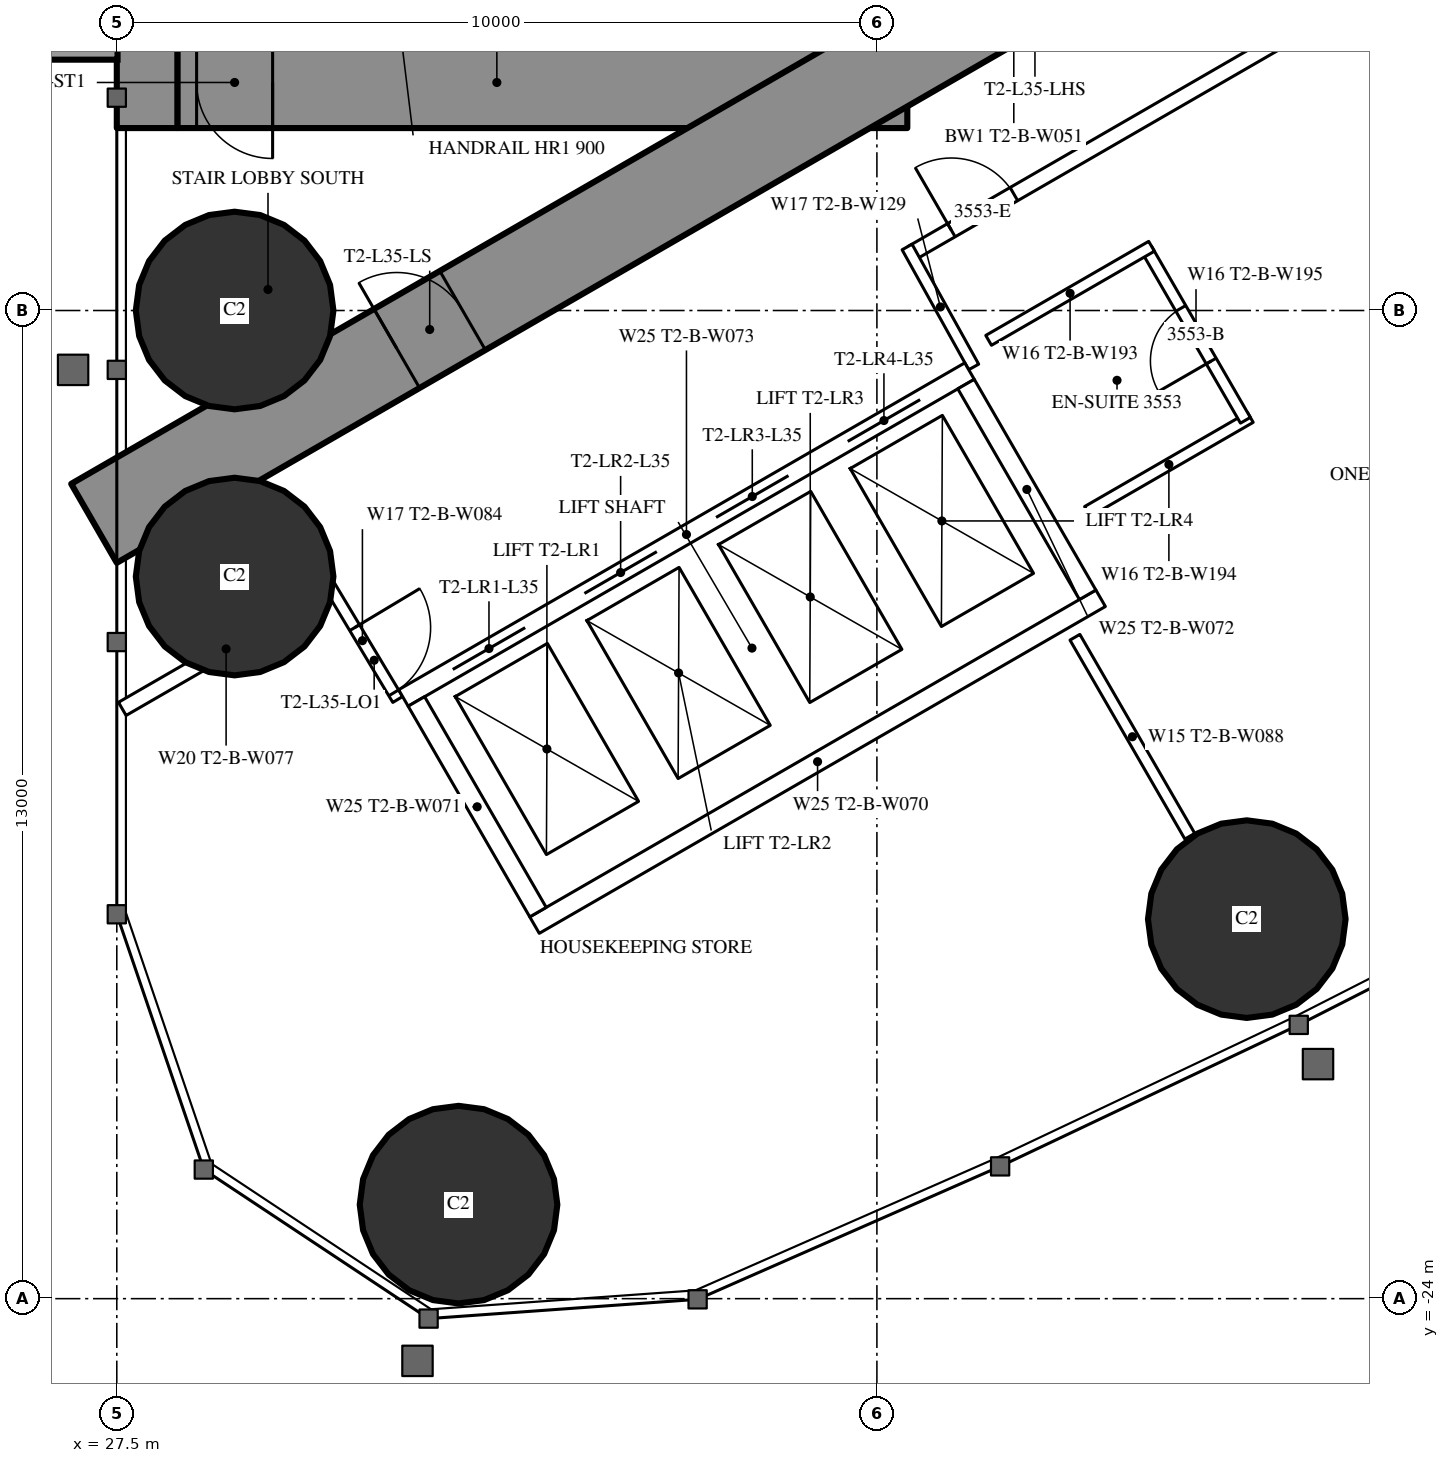
"""IFC4 building model, lengths in metres.
Left out: names, types, materials, properties, quantities, classifications, styles, units other than length and angle.
Written with IfcOpenShell. Run it as: python <this file> out.ifc"""

import sys

from ifc_helpers import new_model, si_unit, direction, frame, frame_2d, origin, origin_2d, place, context, subcontext, project, spatial, rectangle, hollow_circle, extrude, element, fill, save


model = new_model("IFC4")
c1 = context("Model", 3, precision=1e-05, world=origin(), true_north=direction((0.0, 1.0)))
c2 = subcontext(c1, "Body", "Model", "MODEL_VIEW")
j1 = project(units=[si_unit("LENGTHUNIT", "METRE"), si_unit("PLANEANGLEUNIT", "RADIAN")], contexts=[c1])
p1 = place(None, origin())
s1 = spatial("IfcSite", under=j1, at=p1, CompositionType="ELEMENT")
p2 = place(p1, origin())
s2 = spatial("IfcBuilding", under=s1, at=p2, CompositionType="ELEMENT")
p3 = place(p2, frame((0.0, 0.0, 132.6)))
s3 = spatial("IfcBuildingStorey", under=s2, at=p3, CompositionType="ELEMENT", Elevation=132.6)
for number, where, z_axis, x_axis in (
    (1, (31.996, -22.763, 0.0), (0.0, 0.0, 1.0), (1.0, 0.0, 0.0)),
    (2, (29.05, -11.0, 0.0), (0.0, 0.0, 1.0), (1.0, 0.0, 0.0)),
    (3, (29.05, -14.5, 0.0), (0.0, 0.0, 1.0), (1.0, 0.0, 0.0)),
    (4, (42.366, -19.007, 0.0), (0.0, 0.0, 1.0), (1.0, 0.0, 0.0)),
):
    element("IfcColumn", number, at=place(p3, frame(where, z_axis=z_axis, x_axis=x_axis)), inside=s3, PredefinedType="COLUMN", context=c2, shape_type="SweptSolid", body=[
        extrude(hollow_circle(Radius=1.3, WallThickness=0.1, at=origin_2d()), origin(), (0.0, 0.0, 1.0), 3.5),
    ])
p4 = place(p3, frame((27.9, -8.6, 0.0), z_axis=(0.0, 0.0, 1.0), x_axis=(0.0, 1.0, 0.0)))
e5 = element("IfcWall", 5, at=p4, inside=s3, PredefinedType="SHEAR", context=c2, shape_type="SweptSolid", body=[
    extrude(rectangle(XDim=17.2, YDim=0.8, at=frame_2d((8.6, 0.0))), origin(), (0.0, 0.0, 1.0), 3.5),
])
p5 = place(p4, frame((2.45, 0.0, 0.6)))
e6 = element("IfcOpeningElement", 6, at=p5, cuts=e5, PredefinedType="OPENING", context=c2, shape_type="SweptSolid", body=[
    extrude(rectangle(XDim=0.6, YDim=2.1, at=frame_2d((0.3, 1.05))), frame((0.0, 0.41, 0.0), z_axis=(0.0, -1.0, 0.0), x_axis=(1.0, 0.0, 0.0)), (0.0, 0.0, 1.0), 0.82),
])
p6 = place(p4, frame((14.15, 0.0, 0.6)))
e7 = element("IfcOpeningElement", 7, at=p6, cuts=e5, PredefinedType="OPENING", context=c2, shape_type="SweptSolid", body=[
    extrude(rectangle(XDim=0.6, YDim=2.1, at=frame_2d((0.3, 1.05))), frame((0.0, 0.41, 0.0), z_axis=(0.0, -1.0, 0.0), x_axis=(1.0, 0.0, 0.0)), (0.0, 0.0, 1.0), 0.82),
])
p7 = place(p3, frame((37.3, -8.6, 0.0), z_axis=(0.0, 0.0, 1.0), x_axis=(0.0, 1.0, 0.0)))
e8 = element("IfcWall", 8, at=p7, inside=s3, PredefinedType="SHEAR", context=c2, shape_type="SweptSolid", body=[
    extrude(rectangle(XDim=17.2, YDim=1.2, at=frame_2d((8.6, 0.0))), origin(), (0.0, 0.0, 1.0), 3.5),
])
p8 = place(p7, frame((7.7, 0.0, 0.0)))
e9 = element("IfcOpeningElement", 9, at=p8, cuts=e8, PredefinedType="OPENING", context=c2, shape_type="SweptSolid", body=[
    extrude(rectangle(XDim=1.8, YDim=2.2, at=frame_2d((0.9, 1.1))), frame((0.0, 0.61, 0.0), z_axis=(0.0, -1.0, 0.0), x_axis=(1.0, 0.0, 0.0)), (0.0, 0.0, 1.0), 1.22),
])
p9 = place(p3, frame((28.3, -8.0, 0.0), z_axis=(0.0, 0.0, 1.0), x_axis=(1.0, 0.0, 0.0)))
e10 = element("IfcWall", 10, at=p9, inside=s3, PredefinedType="SHEAR", context=c2, shape_type="SweptSolid", body=[
    extrude(rectangle(XDim=8.4, YDim=1.2, at=frame_2d((4.2, 0.0))), origin(), (0.0, 0.0, 1.0), 3.5),
])
p10 = place(p9, frame((0.25, 0.0, 0.0)))
e11 = element("IfcOpeningElement", 11, at=p10, cuts=e10, PredefinedType="OPENING", context=c2, shape_type="SweptSolid", body=[
    extrude(rectangle(XDim=1.0, YDim=2.2, at=frame_2d((0.5, 1.1))), frame((0.0, 0.61, 0.0), z_axis=(0.0, -1.0, 0.0), x_axis=(1.0, 0.0, 0.0)), (0.0, 0.0, 1.0), 1.22),
])
p11 = place(p3, frame((27.2, -13.8, 0.0), z_axis=(0.0, 0.0, 1.0), x_axis=(0.866027159892, 0.499996958321, 0.0)))
e12 = element("IfcWall", 12, at=p11, inside=s3, PredefinedType="SHEAR", context=c2, shape_type="SweptSolid", body=[
    extrude(rectangle(XDim=27.947, YDim=1.2, at=frame_2d((13.973, 0.0))), origin(), (0.0, 0.0, 1.0), 3.5),
])
p12 = place(p11, frame((4.6, 0.0, 0.0)))
e13 = element("IfcOpeningElement", 13, at=p12, cuts=e12, PredefinedType="OPENING", context=c2, shape_type="SweptSolid", body=[
    extrude(rectangle(XDim=1.0, YDim=2.2, at=frame_2d((0.5, 1.1))), frame((0.0, 0.61, 0.0), z_axis=(0.0, -1.0, 0.0), x_axis=(1.0, 0.0, 0.0)), (0.0, 0.0, 1.0), 1.22),
])
p13 = place(p11, frame((13.395, 0.0, 0.0)))
e14 = element("IfcOpeningElement", 14, at=p13, cuts=e12, PredefinedType="OPENING", context=c2, shape_type="SweptSolid", body=[
    extrude(rectangle(XDim=1.8, YDim=2.2, at=frame_2d((0.9, 1.1))), frame((0.0, 0.61, 0.0), z_axis=(0.0, -1.0, 0.0), x_axis=(1.0, 0.0, 0.0)), (0.0, 0.0, 1.0), 1.22),
])
p14 = place(p3, frame((40.105, -15.299, 0.0), z_axis=(0.0, 0.0, 1.0), x_axis=(0.499978822259, -0.866037630414, 0.0)))
e15 = element("IfcWall", 15, at=p14, inside=s3, PredefinedType="PARTITIONING", context=c2, shape_type="SweptSolid", body=[
    extrude(rectangle(XDim=3.023, YDim=0.15, at=frame_2d((1.511, 0.0))), origin(), (0.0, 0.0, 1.0), 3.25),
])
p15 = place(p3, frame((27.572, -16.241, 0.0), z_axis=(0.0, 0.0, 1.0), x_axis=(0.866029654818, 0.499992636921, 0.0)))
e16 = element("IfcWall", 16, at=p15, inside=s3, PredefinedType="PARTITIONING", context=c2, shape_type="SweptSolid", body=[
    extrude(rectangle(XDim=3.155, YDim=0.2, at=frame_2d((1.577, 0.0))), origin(), (0.0, 0.0, 1.0), 3.25),
])
p16 = place(p3, frame((37.96, -10.243, 0.0), z_axis=(0.0, 0.0, 1.0), x_axis=(0.866026429433, 0.499998223521, 0.0)))
e17 = element("IfcWall", 17, at=p16, inside=s3, PredefinedType="PARTITIONING", context=c2, shape_type="SweptSolid", body=[
    extrude(rectangle(XDim=20.487, YDim=0.2, at=frame_2d((10.243, 0.0))), origin(), (0.0, 0.0, 1.0), 3.25),
])
p17 = place(p16, frame((10.743, 0.0, 0.0)))
e18 = element("IfcOpeningElement", 18, at=p17, cuts=e17, PredefinedType="OPENING", context=c2, shape_type="SweptSolid", body=[
    extrude(rectangle(XDim=0.95, YDim=2.2, at=frame_2d((0.475, 1.1))), frame((0.0, 0.11, 0.0), z_axis=(0.0, -1.0, 0.0), x_axis=(1.0, 0.0, 0.0)), (0.0, 0.0, 1.0), 0.22),
])
p18 = place(p16, frame((17.586, 0.0, 0.0)))
e19 = element("IfcOpeningElement", 19, at=p18, cuts=e17, PredefinedType="OPENING", context=c2, shape_type="SweptSolid", body=[
    extrude(rectangle(XDim=1.8, YDim=2.2, at=frame_2d((0.9, 1.1))), frame((0.0, 0.11, 0.0), z_axis=(0.0, -1.0, 0.0), x_axis=(1.0, 0.0, 0.0)), (0.0, 0.0, 1.0), 0.22),
])
p19 = place(p16, frame((0.6, 0.0, 0.0)))
e20 = element("IfcOpeningElement", 20, at=p19, cuts=e17, PredefinedType="OPENING", context=c2, shape_type="SweptSolid", body=[
    extrude(rectangle(XDim=0.95, YDim=2.2, at=frame_2d((0.475, 1.1))), frame((0.0, 0.11, 0.0), z_axis=(0.0, -1.0, 0.0), x_axis=(1.0, 0.0, 0.0)), (0.0, 0.0, 1.0), 0.22),
])
p20 = place(p3, frame((38.773, -11.742, 0.0), z_axis=(0.0, 0.0, 1.0), x_axis=(-0.485528096672, 0.8742210632, 0.0)))
e21 = element("IfcWall", 21, at=p20, inside=s3, PredefinedType="PARTITIONING", context=c2, shape_type="SweptSolid", body=[
    extrude(rectangle(XDim=1.805, YDim=0.15, at=frame_2d((0.903, 0.0))), origin(), (0.0, 0.0, 1.0), 3.25),
])
p21 = place(p3, frame((30.267, -14.569, 0.0), z_axis=(0.0, 0.0, 1.0), x_axis=(0.514336634837, -0.857588377991, 0.0)))
e22 = element("IfcWall", 22, at=p21, inside=s3, PredefinedType="PARTITIONING", context=c2, shape_type="SweptSolid", body=[
    extrude(rectangle(XDim=1.805, YDim=0.15, at=frame_2d((0.903, 0.0))), origin(), (0.0, 0.0, 1.0), 3.25),
])
p22 = place(p21, frame((0.703, 0.0, 0.0)))
e23 = element("IfcOpeningElement", 23, at=p22, cuts=e22, PredefinedType="OPENING", context=c2, shape_type="SweptSolid", body=[
    extrude(rectangle(XDim=1.0, YDim=2.2, at=frame_2d((0.5, 1.1))), frame((0.0, 0.085, 0.0), z_axis=(0.0, -1.0, 0.0), x_axis=(1.0, 0.0, 0.0)), (0.0, 0.0, 1.0), 0.17),
])
p23 = place(p3, frame((40.27, -13.644, 0.0), z_axis=(0.0, 0.0, 1.0), x_axis=(0.866031185235, 0.4999899861, 0.0)))
e24 = element("IfcWall", 24, at=p23, inside=s3, PredefinedType="PARTITIONING", context=c2, shape_type="SweptSolid", body=[
    extrude(rectangle(XDim=2.475, YDim=0.15, at=frame_2d((1.238, 0.0))), origin(), (0.0, 0.0, 1.0), 3.25),
])
p24 = place(p3, frame((41.048, -10.193, 0.0), z_axis=(0.0, 0.0, 1.0), x_axis=(0.500047596559, -0.865997922154, 0.0)))
e25 = element("IfcWall", 25, at=p24, inside=s3, PredefinedType="PARTITIONING", context=c2, shape_type="SweptSolid", body=[
    extrude(rectangle(XDim=2.6, YDim=0.15, at=frame_2d((1.3, 0.0))), origin(), (0.0, 0.0, 1.0), 3.25),
])
p25 = place(p24, frame((0.9, 0.0, 0.0)))
e26 = element("IfcOpeningElement", 26, at=p25, cuts=e25, PredefinedType="OPENING", context=c2, shape_type="SweptSolid", body=[
    extrude(rectangle(XDim=0.8, YDim=2.2, at=frame_2d((0.4, 1.1))), frame((0.0, 0.085, 0.0), z_axis=(0.0, -1.0, 0.0), x_axis=(1.0, 0.0, 0.0)), (0.0, 0.0, 1.0), 0.17),
])
p26 = place(p3, frame((38.97, -11.393, 0.0), z_axis=(0.0, 0.0, 1.0), x_axis=(0.866031185235, 0.4999899861, 0.0)))
e27 = element("IfcWall", 27, at=p26, inside=s3, PredefinedType="PARTITIONING", context=c2, shape_type="SweptSolid", body=[
    extrude(rectangle(XDim=2.475, YDim=0.15, at=frame_2d((1.238, 0.0))), origin(), (0.0, 0.0, 1.0), 3.25),
])
p27 = place(p3, frame((31.271, -16.097, 0.0), z_axis=(0.0, 0.0, 1.0), x_axis=(0.86604045752, 0.499973925258, 0.0)))
e28 = element("IfcWall", 28, at=p27, inside=s3, PredefinedType="PARTITIONING", context=c2, shape_type="SweptSolid", body=[
    extrude(rectangle(XDim=8.6, YDim=0.25, at=frame_2d((4.3, 0.0))), origin(), (0.0, 0.0, 1.0), 3.25),
])
p28 = place(p27, frame((0.75, 0.0, 0.0)))
e29 = element("IfcOpeningElement", 29, at=p28, cuts=e28, PredefinedType="OPENING", context=c2, shape_type="SweptSolid", body=[
    extrude(rectangle(XDim=1.1, YDim=2.2, at=frame_2d((0.55, 1.1))), frame((0.0, 0.135, 0.0), z_axis=(0.0, -1.0, 0.0), x_axis=(1.0, 0.0, 0.0)), (0.0, 0.0, 1.0), 0.27),
])
p29 = place(p27, frame((2.75, 0.0, 0.0)))
e30 = element("IfcOpeningElement", 30, at=p29, cuts=e28, PredefinedType="OPENING", context=c2, shape_type="SweptSolid", body=[
    extrude(rectangle(XDim=1.1, YDim=2.2, at=frame_2d((0.55, 1.1))), frame((0.0, 0.135, 0.0), z_axis=(0.0, -1.0, 0.0), x_axis=(1.0, 0.0, 0.0)), (0.0, 0.0, 1.0), 0.27),
])
p30 = place(p27, frame((4.75, 0.0, 0.0)))
e31 = element("IfcOpeningElement", 31, at=p30, cuts=e28, PredefinedType="OPENING", context=c2, shape_type="SweptSolid", body=[
    extrude(rectangle(XDim=1.1, YDim=2.2, at=frame_2d((0.55, 1.1))), frame((0.0, 0.135, 0.0), z_axis=(0.0, -1.0, 0.0), x_axis=(1.0, 0.0, 0.0)), (0.0, 0.0, 1.0), 0.27),
])
p31 = place(p27, frame((6.75, 0.0, 0.0)))
e32 = element("IfcOpeningElement", 32, at=p31, cuts=e28, PredefinedType="OPENING", context=c2, shape_type="SweptSolid", body=[
    extrude(rectangle(XDim=1.1, YDim=2.2, at=frame_2d((0.55, 1.1))), frame((0.0, 0.135, 0.0), z_axis=(0.0, -1.0, 0.0), x_axis=(1.0, 0.0, 0.0)), (0.0, 0.0, 1.0), 0.27),
])
p32 = place(p3, frame((32.996, -19.086, 0.0), z_axis=(0.0, 0.0, 1.0), x_axis=(0.866028165386, 0.499995216735, 0.0)))
e33 = element("IfcWall", 33, at=p32, inside=s3, PredefinedType="PARTITIONING", context=c2, shape_type="SweptSolid", body=[
    extrude(rectangle(XDim=8.6, YDim=0.25, at=frame_2d((4.3, 0.0))), origin(), (0.0, 0.0, 1.0), 3.25),
])
for number, where, z_axis, x_axis in (
    (34, (31.441, -16.143, 0.0), (0.0, 0.0, 1.0), (0.5, -0.866, 0.0)),
    (35, (38.673, -11.968, 0.0), (0.0, 0.0, 1.0), (0.5, -0.866, 0.0)),
):
    element("IfcWall", number, at=place(p3, frame(where, z_axis=z_axis, x_axis=x_axis)), inside=s3, PredefinedType="PARTITIONING", context=c2, shape_type="SweptSolid", body=[
        extrude(rectangle(XDim=3.201, YDim=0.25, at=frame_2d((1.6, 0.0))), origin(), (0.0, 0.0, 1.0), 3.25),
    ])
p33 = place(p25, origin())
e36 = element("IfcDoor", 36, at=p33, inside=s3, OperationType="SINGLE_SWING_RIGHT", PredefinedType="DOOR", context=c2, shape_type="SweptSolid", body=[
    extrude(rectangle(XDim=0.8, YDim=2.2, at=frame_2d((0.4, 1.1))), frame((0.0, 0.025, 0.0), z_axis=(0.0, -1.0, 0.0), x_axis=(1.0, 0.0, 0.0)), (0.0, 0.0, 1.0), 0.05),
])
fill(e26, e36)
p34 = place(p19, origin())
e37 = element("IfcDoor", 37, at=p34, inside=s3, OperationType="SINGLE_SWING_LEFT", PredefinedType="DOOR", context=c2, shape_type="SweptSolid", body=[
    extrude(rectangle(XDim=0.95, YDim=2.2, at=frame_2d((0.475, 1.1))), frame((0.0, 0.025, 0.0), z_axis=(0.0, -1.0, 0.0), x_axis=(1.0, 0.0, 0.0)), (0.0, 0.0, 1.0), 0.05),
])
fill(e20, e37)
p35 = place(p22, origin())
e38 = element("IfcDoor", 38, at=p35, inside=s3, OperationType="SINGLE_SWING_LEFT", PredefinedType="DOOR", context=c2, shape_type="SweptSolid", body=[
    extrude(rectangle(XDim=1.0, YDim=2.2, at=frame_2d((0.5, 1.1))), frame((0.0, 0.025, 0.0), z_axis=(0.0, -1.0, 0.0), x_axis=(1.0, 0.0, 0.0)), (0.0, 0.0, 1.0), 0.05),
])
fill(e23, e38)
p36 = place(p12, origin())
e39 = element("IfcDoor", 39, at=p36, inside=s3, OperationType="SINGLE_SWING_LEFT", PredefinedType="DOOR", context=c2, shape_type="SweptSolid", body=[
    extrude(rectangle(XDim=1.0, YDim=2.2, at=frame_2d((0.5, 1.1))), frame((0.0, 0.025, 0.0), z_axis=(0.0, -1.0, 0.0), x_axis=(1.0, 0.0, 0.0)), (0.0, 0.0, 1.0), 0.05),
])
fill(e13, e39)
p37 = place(p10, origin())
e40 = element("IfcDoor", 40, at=p37, inside=s3, OperationType="SINGLE_SWING_RIGHT", PredefinedType="DOOR", context=c2, shape_type="SweptSolid", body=[
    extrude(rectangle(XDim=1.0, YDim=2.2, at=frame_2d((0.5, 1.1))), frame((0.0, 0.025, 0.0), z_axis=(0.0, -1.0, 0.0), x_axis=(1.0, 0.0, 0.0)), (0.0, 0.0, 1.0), 0.05),
])
fill(e11, e40)
p38 = place(p28, origin())
e41 = element("IfcDoor", 41, at=p38, inside=s3, OperationType="DOUBLE_DOOR_SLIDING", PredefinedType="USERDEFINED", context=c2, shape_type="SweptSolid", body=[
    extrude(rectangle(XDim=1.1, YDim=2.2, at=frame_2d((0.55, 1.1))), frame((0.0, 0.025, 0.0), z_axis=(0.0, -1.0, 0.0), x_axis=(1.0, 0.0, 0.0)), (0.0, 0.0, 1.0), 0.05),
])
fill(e29, e41)
p39 = place(p29, origin())
e42 = element("IfcDoor", 42, at=p39, inside=s3, OperationType="DOUBLE_DOOR_SLIDING", PredefinedType="USERDEFINED", context=c2, shape_type="SweptSolid", body=[
    extrude(rectangle(XDim=1.1, YDim=2.2, at=frame_2d((0.55, 1.1))), frame((0.0, 0.025, 0.0), z_axis=(0.0, -1.0, 0.0), x_axis=(1.0, 0.0, 0.0)), (0.0, 0.0, 1.0), 0.05),
])
fill(e30, e42)
p40 = place(p30, origin())
e43 = element("IfcDoor", 43, at=p40, inside=s3, OperationType="DOUBLE_DOOR_SLIDING", PredefinedType="USERDEFINED", context=c2, shape_type="SweptSolid", body=[
    extrude(rectangle(XDim=1.1, YDim=2.2, at=frame_2d((0.55, 1.1))), frame((0.0, 0.025, 0.0), z_axis=(0.0, -1.0, 0.0), x_axis=(1.0, 0.0, 0.0)), (0.0, 0.0, 1.0), 0.05),
])
fill(e31, e43)
p41 = place(p31, origin())
e44 = element("IfcDoor", 44, at=p41, inside=s3, OperationType="DOUBLE_DOOR_SLIDING", PredefinedType="USERDEFINED", context=c2, shape_type="SweptSolid", body=[
    extrude(rectangle(XDim=1.1, YDim=2.2, at=frame_2d((0.55, 1.1))), frame((0.0, 0.025, 0.0), z_axis=(0.0, -1.0, 0.0), x_axis=(1.0, 0.0, 0.0)), (0.0, 0.0, 1.0), 0.05),
])
fill(e32, e44)
save(model, sys.argv[1])
